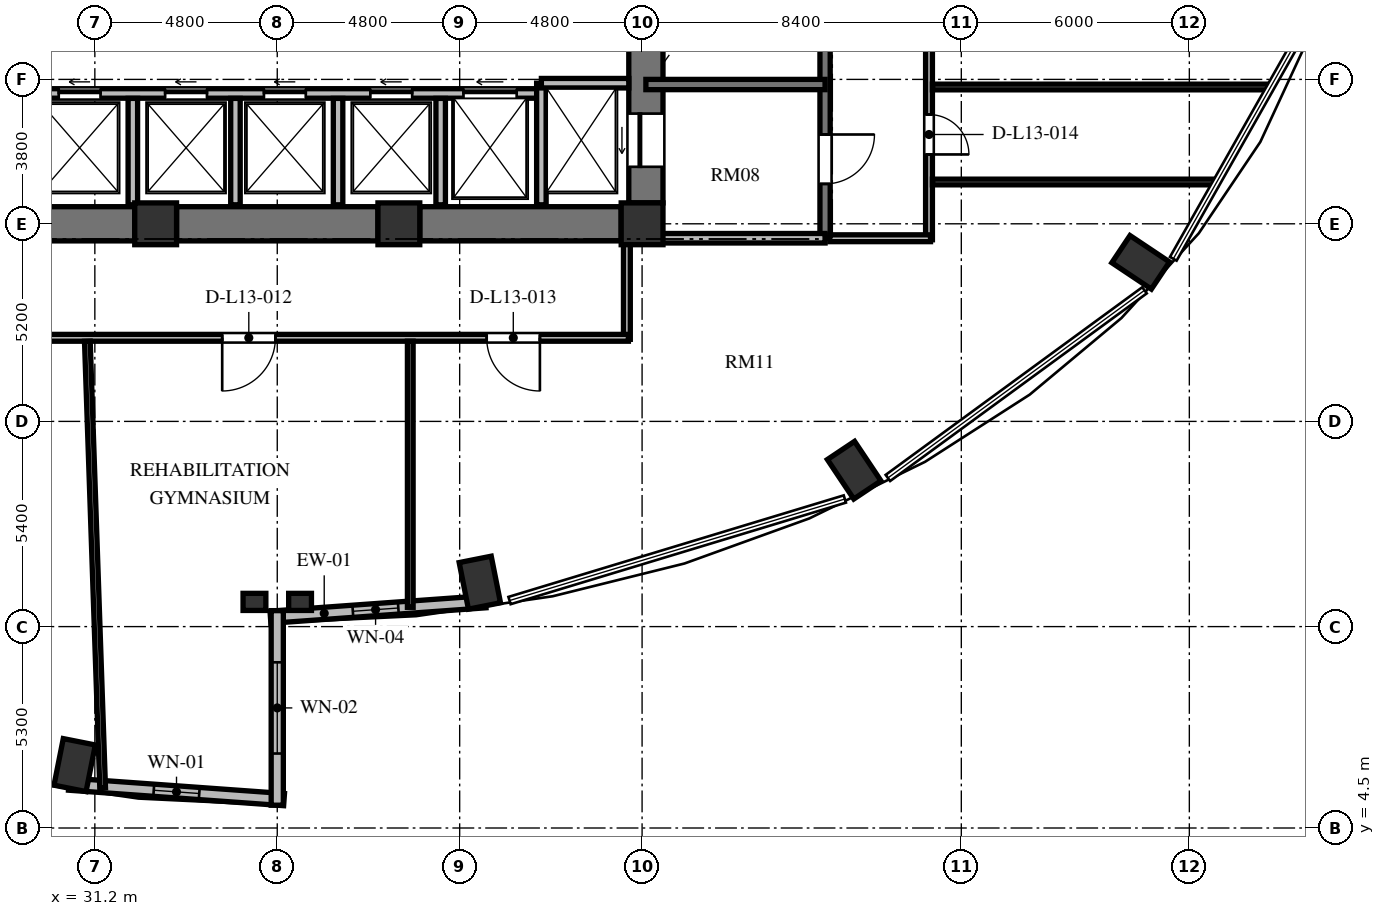
"""IFC4 building model, lengths in metres.
Left out: names, types, materials, properties, quantities, classifications, styles, units other than length and angle.
Written with IfcOpenShell. Run it as: python <this file> out.ifc"""

import sys

from ifc_helpers import new_model, si_unit, direction, frame, frame_2d, origin, origin_2d, place, context, subcontext, project, spatial, rectangle, extrude, element, fill, save


model = new_model("IFC4")
c1 = context("Model", 3, precision=1e-05, world=origin(), true_north=direction((0.0, 1.0)))
c2 = subcontext(c1, "Body", "Model", "MODEL_VIEW")
j1 = project(units=[si_unit("LENGTHUNIT", "METRE"), si_unit("PLANEANGLEUNIT", "RADIAN")], contexts=[c1])
p1 = place(None, origin())
s1 = spatial("IfcSite", under=j1, at=p1, CompositionType="ELEMENT")
p2 = place(p1, origin())
s2 = spatial("IfcBuilding", under=s1, at=p2, CompositionType="ELEMENT")
p3 = place(p2, frame((0.0, 0.0, 54.384)))
s3 = spatial("IfcBuildingStorey", under=s2, at=p3, CompositionType="ELEMENT", Elevation=54.384)
for number, where, z_axis, x_axis in (
    (1, (41.331, 10.956, 0.0), (0.0, 0.0, 1.0), (0.195, -0.981, 0.0)),
    (2, (51.181, 13.916, 0.0), (0.0, 0.0, 1.0), (0.556, -0.831, 0.0)),
    (3, (58.72, 19.386, 0.0), (0.0, 0.0, 1.0), (0.831, -0.556, 0.0)),
    (4, (30.669, 6.156, 0.0), (0.0, 0.0, 1.0), (-0.195, -0.981, 0.0)),
):
    element("IfcColumn", number, at=place(p3, frame(where, z_axis=z_axis, x_axis=x_axis)), inside=s3, PredefinedType="COLUMN", context=c2, shape_type="SweptSolid", body=[
        extrude(rectangle(XDim=1.25, YDim=0.86, at=origin_2d()), origin(), (0.0, 0.0, 1.0), 3.648),
    ])
for number, where, z_axis, x_axis in (
    (5, (32.8, 20.4, 0.0), (0.0, 0.0, 1.0), (1.0, 0.0, 0.0)),
    (6, (39.2, 20.4, 0.0), (0.0, 0.0, 1.0), (1.0, 0.0, 0.0)),
    (7, (45.6, 20.4, 0.0), (0.0, 0.0, 1.0), (1.0, 0.0, 0.0)),
):
    element("IfcColumn", number, at=place(p3, frame(where, z_axis=z_axis, x_axis=x_axis)), inside=s3, PredefinedType="COLUMN", context=c2, shape_type="SweptSolid", body=[
        extrude(rectangle(XDim=1.1, YDim=1.1, at=origin_2d()), origin(), (0.0, 0.0, 1.0), 3.648),
    ])
for number, where, z_axis, x_axis in (
    (8, (35.4, 10.45, 0.0), (0.0, 0.0, 1.0), (1.0, 0.0, 0.0)),
    (9, (36.6, 10.45, 0.0), (0.0, 0.0, 1.0), (1.0, 0.0, 0.0)),
):
    element("IfcColumn", number, at=place(p3, frame(where, z_axis=z_axis, x_axis=x_axis)), inside=s3, PredefinedType="PILASTER", context=c2, shape_type="SweptSolid", body=[
        extrude(rectangle(XDim=0.6, YDim=0.45, at=origin_2d()), origin(), (0.0, 0.0, 1.0), 3.648),
    ])
p4 = place(p3, frame((45.7, 20.95, 0.0), z_axis=(0.0, 0.0, 1.0), x_axis=(0.0, 1.0, 0.0)))
e10 = element("IfcWall", 10, at=p4, inside=s3, PredefinedType="SHEAR", context=c2, shape_type="SweptSolid", body=[
    extrude(rectangle(XDim=14.1, YDim=0.9, at=frame_2d((7.05, 0.0))), origin(), (0.0, 0.0, 1.0), 3.648),
])
p5 = place(p4, frame((11.75, 0.0, 0.0)))
e11 = element("IfcOpeningElement", 11, at=p5, cuts=e10, PredefinedType="OPENING", context=c2, shape_type="SweptSolid", body=[
    extrude(rectangle(XDim=1.4, YDim=2.3, at=frame_2d((0.7, 1.15))), frame((0.0, 0.46, 0.0), z_axis=(0.0, -1.0, 0.0), x_axis=(1.0, 0.0, 0.0)), (0.0, 0.0, 1.0), 0.92),
])
p6 = place(p4, frame((0.95, 0.0, 0.0)))
e12 = element("IfcOpeningElement", 12, at=p6, cuts=e10, PredefinedType="OPENING", context=c2, shape_type="SweptSolid", body=[
    extrude(rectangle(XDim=1.4, YDim=2.3, at=frame_2d((0.7, 1.15))), frame((0.0, 0.46, 0.0), z_axis=(0.0, -1.0, 0.0), x_axis=(1.0, 0.0, 0.0)), (0.0, 0.0, 1.0), 0.92),
])
p7 = place(p3, frame((26.95, 20.4, 0.0), z_axis=(0.0, 0.0, 1.0), x_axis=(1.0, 0.0, 0.0)))
e13 = element("IfcWall", 13, at=p7, inside=s3, PredefinedType="SHEAR", context=c2, shape_type="SweptSolid", body=[
    extrude(rectangle(XDim=5.3, YDim=0.9, at=frame_2d((2.65, 0.0))), origin(), (0.0, 0.0, 1.0), 3.648),
])
p8 = place(p3, frame((33.35, 20.4, 0.0), z_axis=(0.0, 0.0, 1.0), x_axis=(1.0, 0.0, 0.0)))
e14 = element("IfcWall", 14, at=p8, inside=s3, PredefinedType="SHEAR", context=c2, shape_type="SweptSolid", body=[
    extrude(rectangle(XDim=5.3, YDim=0.9, at=frame_2d((2.65, 0.0))), origin(), (0.0, 0.0, 1.0), 3.648),
])
p9 = place(p3, frame((39.75, 20.4, 0.0), z_axis=(0.0, 0.0, 1.0), x_axis=(1.0, 0.0, 0.0)))
e15 = element("IfcWall", 15, at=p9, inside=s3, PredefinedType="SHEAR", context=c2, shape_type="SweptSolid", body=[
    extrude(rectangle(XDim=5.3, YDim=0.9, at=frame_2d((2.65, 0.0))), origin(), (0.0, 0.0, 1.0), 3.648),
])
p10 = place(p3, frame((35.821, 10.047, 0.0), z_axis=(0.0, 0.0, 1.0), x_axis=(0.997422321809, 0.071754525696, 0.0)))
e16 = element("IfcWall", 16, at=p10, inside=s3, PredefinedType="SOLIDWALL", context=c2, shape_type="SweptSolid", body=[
    extrude(rectangle(XDim=5.675, YDim=0.32, at=frame_2d((2.838, 0.0))), origin(), (0.0, 0.0, 1.0), 3.428),
])
p11 = place(p10, frame((2.174, 0.0, 0.85)))
e17 = element("IfcOpeningElement", 17, at=p11, cuts=e16, PredefinedType="OPENING", context=c2, shape_type="SweptSolid", body=[
    extrude(rectangle(XDim=1.2, YDim=1.8, at=frame_2d((0.6, 0.9))), frame((0.0, 0.17, 0.0), z_axis=(0.0, -1.0, 0.0), x_axis=(1.0, 0.0, 0.0)), (0.0, 0.0, 1.0), 0.34),
])
p12 = place(p3, frame((30.519, 5.654, 0.0), z_axis=(0.0, 0.0, 1.0), x_axis=(0.997421878774, -0.071760683825, 0.0)))
e18 = element("IfcWall", 18, at=p12, inside=s3, PredefinedType="SOLIDWALL", context=c2, shape_type="SweptSolid", body=[
    extrude(rectangle(XDim=5.675, YDim=0.32, at=frame_2d((2.837, 0.0))), origin(), (0.0, 0.0, 1.0), 3.428),
])
p13 = place(p12, frame((2.237, 0.0, 0.85)))
e19 = element("IfcOpeningElement", 19, at=p13, cuts=e18, PredefinedType="OPENING", context=c2, shape_type="SweptSolid", body=[
    extrude(rectangle(XDim=1.2, YDim=2.2, at=frame_2d((0.6, 1.1))), frame((0.0, 0.17, 0.0), z_axis=(0.0, -1.0, 0.0), x_axis=(1.0, 0.0, 0.0)), (0.0, 0.0, 1.0), 0.34),
])
p14 = place(p3, frame((36.0, 5.1, 0.0), z_axis=(0.0, 0.0, 1.0), x_axis=(0.0, 1.0, 0.0)))
e20 = element("IfcWall", 20, at=p14, inside=s3, PredefinedType="SOLIDWALL", context=c2, shape_type="SweptSolid", body=[
    extrude(rectangle(XDim=5.12, YDim=0.32, at=frame_2d((2.56, 0.0))), origin(), (0.0, 0.0, 1.0), 3.428),
])
p15 = place(p14, frame((1.36, 0.0, 0.84)))
e21 = element("IfcOpeningElement", 21, at=p15, cuts=e20, PredefinedType="OPENING", context=c2, shape_type="SweptSolid", body=[
    extrude(rectangle(XDim=2.4, YDim=2.04, at=frame_2d((1.2, 1.02))), frame((0.0, 0.17, 0.0), z_axis=(0.0, -1.0, 0.0), x_axis=(1.0, 0.0, 0.0)), (0.0, 0.0, 1.0), 0.34),
])
p16 = place(p3, frame((26.75, 23.83, 0.0), z_axis=(0.0, 0.0, 1.0), x_axis=(1.0, 0.0, 0.0)))
e22 = element("IfcWall", 22, at=p16, inside=s3, PredefinedType="SOLIDWALL", context=c2, shape_type="SweptSolid", body=[
    extrude(rectangle(XDim=16.2, YDim=0.25, at=frame_2d((8.1, 0.0))), origin(), (0.0, 0.0, 1.0), 3.428),
])
p17 = place(p16, frame((0.9, 0.0, 0.0)))
e23 = element("IfcOpeningElement", 23, at=p17, cuts=e22, PredefinedType="OPENING", context=c2, shape_type="SweptSolid", body=[
    extrude(rectangle(XDim=1.1, YDim=2.2, at=frame_2d((0.55, 1.1))), frame((0.0, 0.135, 0.0), z_axis=(0.0, -1.0, 0.0), x_axis=(1.0, 0.0, 0.0)), (0.0, 0.0, 1.0), 0.27),
])
p18 = place(p16, frame((3.5, 0.0, 0.0)))
e24 = element("IfcOpeningElement", 24, at=p18, cuts=e22, PredefinedType="OPENING", context=c2, shape_type="SweptSolid", body=[
    extrude(rectangle(XDim=1.1, YDim=2.2, at=frame_2d((0.55, 1.1))), frame((0.0, 0.135, 0.0), z_axis=(0.0, -1.0, 0.0), x_axis=(1.0, 0.0, 0.0)), (0.0, 0.0, 1.0), 0.27),
])
p19 = place(p16, frame((6.3, 0.0, 0.0)))
e25 = element("IfcOpeningElement", 25, at=p19, cuts=e22, PredefinedType="OPENING", context=c2, shape_type="SweptSolid", body=[
    extrude(rectangle(XDim=1.1, YDim=2.2, at=frame_2d((0.55, 1.1))), frame((0.0, 0.135, 0.0), z_axis=(0.0, -1.0, 0.0), x_axis=(1.0, 0.0, 0.0)), (0.0, 0.0, 1.0), 0.27),
])
p20 = place(p16, frame((8.9, 0.0, 0.0)))
e26 = element("IfcOpeningElement", 26, at=p20, cuts=e22, PredefinedType="OPENING", context=c2, shape_type="SweptSolid", body=[
    extrude(rectangle(XDim=1.1, YDim=2.2, at=frame_2d((0.55, 1.1))), frame((0.0, 0.135, 0.0), z_axis=(0.0, -1.0, 0.0), x_axis=(1.0, 0.0, 0.0)), (0.0, 0.0, 1.0), 0.27),
])
p21 = place(p16, frame((11.7, 0.0, 0.0)))
e27 = element("IfcOpeningElement", 27, at=p21, cuts=e22, PredefinedType="OPENING", context=c2, shape_type="SweptSolid", body=[
    extrude(rectangle(XDim=1.1, YDim=2.2, at=frame_2d((0.55, 1.1))), frame((0.0, 0.135, 0.0), z_axis=(0.0, -1.0, 0.0), x_axis=(1.0, 0.0, 0.0)), (0.0, 0.0, 1.0), 0.27),
])
p22 = place(p16, frame((14.15, 0.0, 0.0)))
e28 = element("IfcOpeningElement", 28, at=p22, cuts=e22, PredefinedType="OPENING", context=c2, shape_type="SweptSolid", body=[
    extrude(rectangle(XDim=1.4, YDim=2.3, at=frame_2d((0.7, 1.15))), frame((0.0, 0.135, 0.0), z_axis=(0.0, -1.0, 0.0), x_axis=(1.0, 0.0, 0.0)), (0.0, 0.0, 1.0), 0.27),
])
p23 = place(p3, frame((42.95, 20.9, 0.0), z_axis=(0.0, 0.0, 1.0), x_axis=(0.0, 1.0, 0.0)))
e29 = element("IfcWall", 29, at=p23, inside=s3, PredefinedType="SOLIDWALL", context=c2, shape_type="SweptSolid", body=[
    extrude(rectangle(XDim=3.2, YDim=0.25, at=frame_2d((1.6, 0.0))), origin(), (0.0, 0.0, 1.0), 3.428),
])
p24 = place(p3, frame((42.95, 24.1, 0.0), z_axis=(0.0, 0.0, 1.0), x_axis=(1.0, 0.0, 0.0)))
e30 = element("IfcWall", 30, at=p24, inside=s3, PredefinedType="SOLIDWALL", context=c2, shape_type="SweptSolid", body=[
    extrude(rectangle(XDim=2.3, YDim=0.25, at=frame_2d((1.15, 0.0))), origin(), (0.0, 0.0, 1.0), 3.428),
])
for number, where, z_axis, x_axis in (
    (31, (32.2, 20.9, 0.0), (0.0, 0.0, 1.0), (0.0, 1.0, 0.0)),
    (32, (34.9, 20.9, 0.0), (0.0, 0.0, 1.0), (0.0, 1.0, 0.0)),
    (33, (37.6, 20.9, 0.0), (0.0, 0.0, 1.0), (0.0, 1.0, 0.0)),
    (34, (40.3, 20.9, 0.0), (0.0, 0.0, 1.0), (0.0, 1.0, 0.0)),
):
    element("IfcWall", number, at=place(p3, frame(where, z_axis=z_axis, x_axis=x_axis)), inside=s3, PredefinedType="SOLIDWALL", context=c2, shape_type="SweptSolid", body=[
        extrude(rectangle(XDim=2.8, YDim=0.25, at=frame_2d((1.4, 0.0))), origin(), (0.0, 0.0, 1.0), 3.428),
    ])
p25 = place(p3, frame((50.415, 35.845, 0.0), z_axis=(0.0, 0.0, 1.0), x_axis=(0.0, -1.0, 0.0)))
e35 = element("IfcWall", 35, at=p25, inside=s3, PredefinedType="SHEAR", context=c2, shape_type="SweptSolid", body=[
    extrude(rectangle(XDim=15.825, YDim=0.27, at=frame_2d((7.913, 0.0))), origin(), (0.0, 0.0, 1.0), 3.648),
])
p26 = place(p25, frame((4.445, 0.0, 0.0)))
e36 = element("IfcOpeningElement", 36, at=p26, cuts=e35, PredefinedType="OPENING", context=c2, shape_type="SweptSolid", body=[
    extrude(rectangle(XDim=1.2, YDim=2.15, at=frame_2d((0.6, 1.075))), frame((0.0, 0.145, 0.0), z_axis=(0.0, -1.0, 0.0), x_axis=(1.0, 0.0, 0.0)), (0.0, 0.0, 1.0), 0.29),
])
p27 = place(p25, frame((1.295, 0.0, 0.0)))
e37 = element("IfcOpeningElement", 37, at=p27, cuts=e35, PredefinedType="OPENING", context=c2, shape_type="SweptSolid", body=[
    extrude(rectangle(XDim=1.3, YDim=2.2, at=frame_2d((0.65, 1.1))), frame((0.0, 0.145, 0.0), z_axis=(0.0, -1.0, 0.0), x_axis=(1.0, 0.0, 0.0)), (0.0, 0.0, 1.0), 0.29),
])
p28 = place(p25, frame((13.095, 0.0, 0.0)))
e38 = element("IfcOpeningElement", 38, at=p28, cuts=e35, PredefinedType="OPENING", context=c2, shape_type="SweptSolid", body=[
    extrude(rectangle(XDim=1.3, YDim=2.2, at=frame_2d((0.65, 1.1))), frame((0.0, 0.145, 0.0), z_axis=(0.0, -1.0, 0.0), x_axis=(1.0, 0.0, 0.0)), (0.0, 0.0, 1.0), 0.29),
])
p29 = place(p3, frame((45.7, 24.065, 0.0), z_axis=(0.0, 0.0, 1.0), x_axis=(1.0, 0.0, 0.0)))
e39 = element("IfcWall", 39, at=p29, inside=s3, PredefinedType="SHEAR", context=c2, shape_type="SweptSolid", body=[
    extrude(rectangle(XDim=4.715, YDim=0.27, at=frame_2d((2.357, 0.0))), origin(), (0.0, 0.0, 1.0), 3.648),
])
p30 = place(p3, frame((45.7, 20.02, 0.0), z_axis=(0.0, 0.0, 1.0), x_axis=(1.0, 0.0, 0.0)))
e40 = element("IfcWall", 40, at=p30, inside=s3, PredefinedType="SOLIDWALL", context=c2, shape_type="SweptSolid", body=[
    extrude(rectangle(XDim=4.715, YDim=0.25, at=frame_2d((2.357, 0.0))), origin(), (0.0, 0.0, 1.0), 2.813),
])
p31 = place(p3, frame((53.15, 26.64, 0.0), z_axis=(0.0, 0.0, 1.0), x_axis=(0.0, -1.0, 0.0)))
e41 = element("IfcWall", 41, at=p31, inside=s3, PredefinedType="PARTITIONING", context=c2, shape_type="SweptSolid", body=[
    extrude(rectangle(XDim=6.66, YDim=0.18, at=frame_2d((3.33, 0.0))), origin(), (0.0, 0.0, 1.0), 3.428),
])
p32 = place(p31, frame((3.365, 0.0, 0.0)))
e42 = element("IfcOpeningElement", 42, at=p32, cuts=e41, PredefinedType="OPENING", context=c2, shape_type="SweptSolid", body=[
    extrude(rectangle(XDim=1.05, YDim=2.15, at=frame_2d((0.525, 1.075))), frame((0.0, 0.1, 0.0), z_axis=(0.0, -1.0, 0.0), x_axis=(1.0, 0.0, 0.0)), (0.0, 0.0, 1.0), 0.2),
])
p33 = place(p3, frame((53.19, 20.02, 0.0), z_axis=(0.0, 0.0, 1.0), x_axis=(-1.0, 0.0, 0.0)))
e43 = element("IfcWall", 43, at=p33, inside=s3, PredefinedType="PARTITIONING", context=c2, shape_type="SweptSolid", body=[
    extrude(rectangle(XDim=2.65, YDim=0.18, at=frame_2d((1.325, 0.0))), origin(), (0.0, 0.0, 1.0), 2.813),
])
p34 = place(p3, frame((45.2, 19.91, 0.0), z_axis=(0.0, 0.0, 1.0), x_axis=(0.0, -1.0, 0.0)))
e44 = element("IfcWall", 44, at=p34, inside=s3, PredefinedType="PARTITIONING", context=c2, shape_type="SweptSolid", body=[
    extrude(rectangle(XDim=2.55, YDim=0.18, at=frame_2d((1.275, 0.0))), origin(), (0.0, 0.0, 1.0), 3.428),
])
p35 = place(p3, frame((45.24, 17.4, 0.0), z_axis=(0.0, 0.0, 1.0), x_axis=(-1.0, 0.0, 0.0)))
e45 = element("IfcWall", 45, at=p35, inside=s3, PredefinedType="PARTITIONING", context=c2, shape_type="SweptSolid", body=[
    extrude(rectangle(XDim=21.93, YDim=0.18, at=frame_2d((10.965, 0.0))), origin(), (0.0, 0.0, 1.0), 3.053),
])
p36 = place(p35, frame((9.289, 0.0, 0.0)))
e46 = element("IfcOpeningElement", 46, at=p36, cuts=e45, PredefinedType="OPENING", context=c2, shape_type="SweptSolid", body=[
    extrude(rectangle(XDim=1.4, YDim=2.2, at=frame_2d((0.7, 1.1))), frame((0.0, 0.1, 0.0), z_axis=(0.0, -1.0, 0.0), x_axis=(1.0, 0.0, 0.0)), (0.0, 0.0, 1.0), 0.2),
])
p37 = place(p35, frame((2.329, 0.0, 0.0)))
e47 = element("IfcOpeningElement", 47, at=p37, cuts=e45, PredefinedType="OPENING", context=c2, shape_type="SweptSolid", body=[
    extrude(rectangle(XDim=1.4, YDim=2.2, at=frame_2d((0.7, 1.1))), frame((0.0, 0.1, 0.0), z_axis=(0.0, -1.0, 0.0), x_axis=(1.0, 0.0, 0.0)), (0.0, 0.0, 1.0), 0.2),
])
p38 = place(p3, frame((53.24, 21.5, 0.0), z_axis=(0.0, 0.0, 1.0), x_axis=(1.0, 0.0, 0.0)))
e48 = element("IfcWall", 48, at=p38, inside=s3, PredefinedType="PARTITIONING", context=c2, shape_type="SweptSolid", body=[
    extrude(rectangle(XDim=7.479, YDim=0.15, at=frame_2d((3.74, 0.0))), origin(), (0.0, 0.0, 1.0), 3.428),
])
p39 = place(p3, frame((53.24, 24.0, 0.0), z_axis=(0.0, 0.0, 1.0), x_axis=(1.0, 0.0, 0.0)))
e49 = element("IfcWall", 49, at=p39, inside=s3, PredefinedType="PARTITIONING", context=c2, shape_type="SweptSolid", body=[
    extrude(rectangle(XDim=8.895, YDim=0.15, at=frame_2d((4.448, 0.0))), origin(), (0.0, 0.0, 1.0), 3.428),
])
p40 = place(p3, frame((31.405, 5.559, 0.0), z_axis=(0.0, 0.0, 1.0), x_axis=(-0.034219123574, 0.9994143543, 0.0)))
e50 = element("IfcWall", 50, at=p40, inside=s3, PredefinedType="PARTITIONING", context=c2, shape_type="SweptSolid", body=[
    extrude(rectangle(XDim=11.758, YDim=0.15, at=frame_2d((5.879, 0.0))), origin(), (0.0, 0.0, 1.0), 2.813),
])
p41 = place(p3, frame((39.5, 10.308, 0.0), z_axis=(0.0, 0.0, 1.0), x_axis=(0.0, 1.0, 0.0)))
e51 = element("IfcWall", 51, at=p41, inside=s3, PredefinedType="PARTITIONING", context=c2, shape_type="SweptSolid", body=[
    extrude(rectangle(XDim=7.002, YDim=0.15, at=frame_2d((3.501, 0.0))), origin(), (0.0, 0.0, 1.0), 3.428),
])
p42 = place(p11, origin())
e52 = element("IfcWindow", 52, at=p42, inside=s3, PartitioningType="SINGLE_PANEL", PredefinedType="WINDOW", context=c2, shape_type="SweptSolid", body=[
    extrude(rectangle(XDim=1.2, YDim=1.8, at=frame_2d((0.6, 0.9))), frame((0.0, 0.03, 0.0), z_axis=(0.0, -1.0, 0.0), x_axis=(1.0, 0.0, 0.0)), (0.0, 0.0, 1.0), 0.06),
])
fill(e17, e52)
p43 = place(p13, origin())
e53 = element("IfcWindow", 53, at=p43, inside=s3, PartitioningType="SINGLE_PANEL", PredefinedType="WINDOW", context=c2, shape_type="SweptSolid", body=[
    extrude(rectangle(XDim=1.2, YDim=2.2, at=frame_2d((0.6, 1.1))), frame((0.0, 0.03, 0.0), z_axis=(0.0, -1.0, 0.0), x_axis=(1.0, 0.0, 0.0)), (0.0, 0.0, 1.0), 0.06),
])
fill(e19, e53)
p44 = place(p15, origin())
e54 = element("IfcWindow", 54, at=p44, inside=s3, PartitioningType="SINGLE_PANEL", PredefinedType="WINDOW", context=c2, shape_type="SweptSolid", body=[
    extrude(rectangle(XDim=2.4, YDim=2.04, at=frame_2d((1.2, 1.02))), frame((0.0, 0.03, 0.0), z_axis=(0.0, -1.0, 0.0), x_axis=(1.0, 0.0, 0.0)), (0.0, 0.0, 1.0), 0.06),
])
fill(e21, e54)
p45 = place(p18, origin())
e55 = element("IfcDoor", 55, at=p45, inside=s3, OperationType="SLIDING_TO_LEFT", PredefinedType="DOOR", context=c2, shape_type="SweptSolid", body=[
    extrude(rectangle(XDim=1.1, YDim=2.2, at=frame_2d((0.55, 1.1))), frame((0.0, 0.025, 0.0), z_axis=(0.0, -1.0, 0.0), x_axis=(1.0, 0.0, 0.0)), (0.0, 0.0, 1.0), 0.05),
])
fill(e24, e55)
p46 = place(p19, origin())
e56 = element("IfcDoor", 56, at=p46, inside=s3, OperationType="SLIDING_TO_LEFT", PredefinedType="DOOR", context=c2, shape_type="SweptSolid", body=[
    extrude(rectangle(XDim=1.1, YDim=2.2, at=frame_2d((0.55, 1.1))), frame((0.0, 0.025, 0.0), z_axis=(0.0, -1.0, 0.0), x_axis=(1.0, 0.0, 0.0)), (0.0, 0.0, 1.0), 0.05),
])
fill(e25, e56)
p47 = place(p20, origin())
e57 = element("IfcDoor", 57, at=p47, inside=s3, OperationType="SLIDING_TO_LEFT", PredefinedType="DOOR", context=c2, shape_type="SweptSolid", body=[
    extrude(rectangle(XDim=1.1, YDim=2.2, at=frame_2d((0.55, 1.1))), frame((0.0, 0.025, 0.0), z_axis=(0.0, -1.0, 0.0), x_axis=(1.0, 0.0, 0.0)), (0.0, 0.0, 1.0), 0.05),
])
fill(e26, e57)
p48 = place(p21, origin())
e58 = element("IfcDoor", 58, at=p48, inside=s3, OperationType="SLIDING_TO_LEFT", PredefinedType="DOOR", context=c2, shape_type="SweptSolid", body=[
    extrude(rectangle(XDim=1.1, YDim=2.2, at=frame_2d((0.55, 1.1))), frame((0.0, 0.025, 0.0), z_axis=(0.0, -1.0, 0.0), x_axis=(1.0, 0.0, 0.0)), (0.0, 0.0, 1.0), 0.05),
])
fill(e27, e58)
p49 = place(p6, origin())
e59 = element("IfcDoor", 59, at=p49, inside=s3, OperationType="SLIDING_TO_LEFT", PredefinedType="DOOR", context=c2, shape_type="SweptSolid", body=[
    extrude(rectangle(XDim=1.4, YDim=2.3, at=frame_2d((0.7, 1.15))), frame((0.0, 0.025, 0.0), z_axis=(0.0, -1.0, 0.0), x_axis=(1.0, 0.0, 0.0)), (0.0, 0.0, 1.0), 0.05),
])
fill(e12, e59)
p50 = place(p22, origin())
e60 = element("IfcDoor", 60, at=p50, inside=s3, OperationType="SLIDING_TO_LEFT", PredefinedType="DOOR", context=c2, shape_type="SweptSolid", body=[
    extrude(rectangle(XDim=1.4, YDim=2.3, at=frame_2d((0.7, 1.15))), frame((0.0, 0.025, 0.0), z_axis=(0.0, -1.0, 0.0), x_axis=(1.0, 0.0, 0.0)), (0.0, 0.0, 1.0), 0.05),
])
fill(e28, e60)
p51 = place(p28, origin())
e61 = element("IfcDoor", 61, at=p51, inside=s3, OperationType="SINGLE_SWING_LEFT", PredefinedType="DOOR", context=c2, shape_type="SweptSolid", body=[
    extrude(rectangle(XDim=1.3, YDim=2.2, at=frame_2d((0.65, 1.1))), frame((0.0, 0.025, 0.0), z_axis=(0.0, -1.0, 0.0), x_axis=(1.0, 0.0, 0.0)), (0.0, 0.0, 1.0), 0.05),
])
fill(e38, e61)
p52 = place(p36, origin())
e62 = element("IfcDoor", 62, at=p52, inside=s3, OperationType="SINGLE_SWING_RIGHT", PredefinedType="DOOR", context=c2, shape_type="SweptSolid", body=[
    extrude(rectangle(XDim=1.4, YDim=2.2, at=frame_2d((0.7, 1.1))), frame((0.0, 0.025, 0.0), z_axis=(0.0, -1.0, 0.0), x_axis=(1.0, 0.0, 0.0)), (0.0, 0.0, 1.0), 0.05),
])
fill(e46, e62)
p53 = place(p37, origin())
e63 = element("IfcDoor", 63, at=p53, inside=s3, OperationType="SINGLE_SWING_LEFT", PredefinedType="DOOR", context=c2, shape_type="SweptSolid", body=[
    extrude(rectangle(XDim=1.4, YDim=2.2, at=frame_2d((0.7, 1.1))), frame((0.0, 0.025, 0.0), z_axis=(0.0, -1.0, 0.0), x_axis=(1.0, 0.0, 0.0)), (0.0, 0.0, 1.0), 0.05),
])
fill(e47, e63)
p54 = place(p32, origin())
e64 = element("IfcDoor", 64, at=p54, inside=s3, OperationType="SINGLE_SWING_RIGHT", PredefinedType="DOOR", context=c2, shape_type="SweptSolid", body=[
    extrude(rectangle(XDim=1.05, YDim=2.15, at=frame_2d((0.525, 1.075))), frame((0.0, 0.025, 0.0), z_axis=(0.0, -1.0, 0.0), x_axis=(1.0, 0.0, 0.0)), (0.0, 0.0, 1.0), 0.05),
])
fill(e42, e64)
save(model, sys.argv[1])
